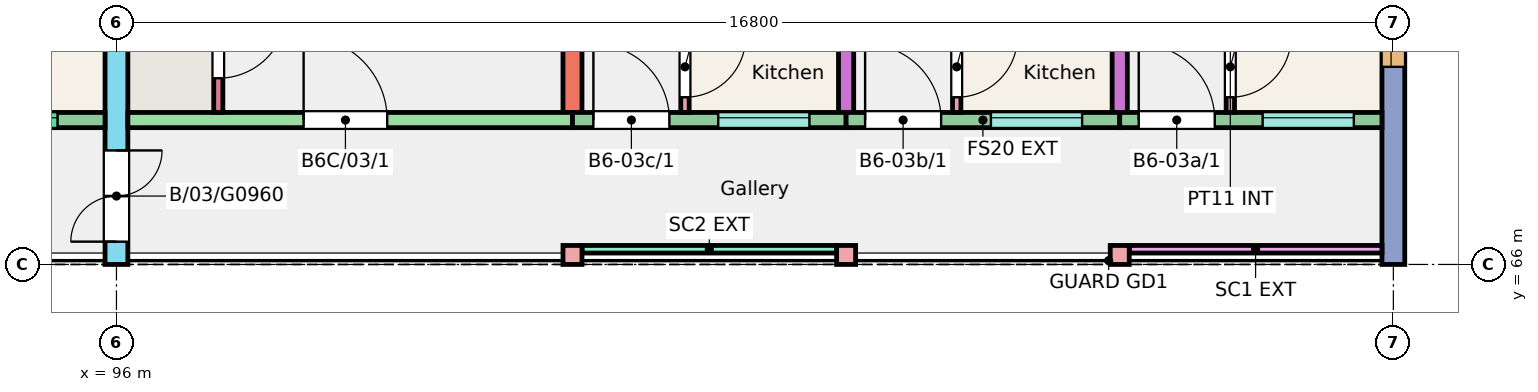
"""IFC4 building model, lengths in metres.
Left out: names, types, materials, properties, quantities, classifications, styles, units other than length and angle.
Written with IfcOpenShell. Run it as: python <this file> out.ifc"""

import sys

from ifc_helpers import new_model, si_unit, direction, frame, frame_2d, origin, origin_2d, place, context, subcontext, project, spatial, rectangle, extrude, element, fill, save


model = new_model("IFC4")
c1 = context("Model", 3, precision=1e-05, world=origin(), true_north=direction((0.0, 1.0)))
c2 = subcontext(c1, "Body", "Model", "MODEL_VIEW")
j1 = project(units=[si_unit("LENGTHUNIT", "METRE"), si_unit("PLANEANGLEUNIT", "RADIAN")], contexts=[c1])
p1 = place(None, origin())
s1 = spatial("IfcSite", under=j1, at=p1, CompositionType="ELEMENT")
p2 = place(p1, origin())
s2 = spatial("IfcBuilding", under=s1, at=p2, CompositionType="ELEMENT")
p3 = place(p2, frame((0.0, 0.0, 9.0)))
s3 = spatial("IfcBuildingStorey", under=s2, at=p3, CompositionType="ELEMENT", Elevation=9.0)
p4 = place(p3, frame((96.0, 66.0, 0.0), z_axis=(0.0, 0.0, 1.0), x_axis=(0.0, 1.0, 0.0)))
e1 = element("IfcWall", 1, at=p4, inside=s3, PredefinedType="SHEAR", context=c2, shape_type="SweptSolid", body=[
    extrude(rectangle(XDim=11.0, YDim=0.3, at=frame_2d((5.5, 0.0))), origin(), (0.0, 0.0, 1.0), 3.0),
])
p5 = place(p4, frame((0.3, 0.0, 0.0)))
e2 = element("IfcOpeningElement", 2, at=p5, cuts=e1, PredefinedType="OPENING", context=c2, shape_type="SweptSolid", body=[
    extrude(rectangle(XDim=1.2, YDim=2.1, at=frame_2d((0.6, 1.05))), frame((0.0, 0.16, 0.0), z_axis=(0.0, -1.0, 0.0), x_axis=(1.0, 0.0, 0.0)), (0.0, 0.0, 1.0), 0.32),
])
p6 = place(p3, frame((102.0, 68.0, 0.0), z_axis=(0.0, 0.0, 1.0), x_axis=(0.0, 1.0, 0.0)))
e3 = element("IfcWall", 3, at=p6, inside=s3, PredefinedType="SHEAR", context=c2, shape_type="SweptSolid", body=[
    extrude(rectangle(XDim=9.0, YDim=0.25, at=frame_2d((4.5, 0.0))), origin(), (0.0, 0.0, 1.0), 3.0),
])
for number, where, z_axis, x_axis in (
    (4, (105.6, 68.0, 0.0), (0.0, 0.0, 1.0), (0.0, 1.0, 0.0)),
    (5, (109.2, 68.0, 0.0), (0.0, 0.0, 1.0), (0.0, 1.0, 0.0)),
):
    element("IfcWall", number, at=place(p3, frame(where, z_axis=z_axis, x_axis=x_axis)), inside=s3, PredefinedType="SHEAR", context=c2, shape_type="SweptSolid", body=[
        extrude(rectangle(XDim=9.0, YDim=0.2, at=frame_2d((4.5, 0.0))), origin(), (0.0, 0.0, 1.0), 3.0),
    ])
p7 = place(p3, frame((112.8, 66.0, 0.0), z_axis=(0.0, 0.0, 1.0), x_axis=(0.0, 1.0, 0.0)))
e6 = element("IfcWall", 6, at=p7, inside=s3, PredefinedType="SHEAR", context=c2, shape_type="SweptSolid", body=[
    extrude(rectangle(XDim=11.0, YDim=0.3, at=frame_2d((5.5, 0.0))), origin(), (0.0, 0.0, 1.0), 3.0),
])
p8 = place(p7, frame((2.6, 0.0, 0.9)))
e7 = element("IfcOpeningElement", 7, at=p8, cuts=e6, PredefinedType="OPENING", context=c2, shape_type="SweptSolid", body=[
    extrude(rectangle(XDim=1.2, YDim=1.5, at=frame_2d((0.6, 0.75))), frame((0.0, 0.16, 0.0), z_axis=(0.0, -1.0, 0.0), x_axis=(1.0, 0.0, 0.0)), (0.0, 0.0, 1.0), 0.32),
])
p9 = place(p7, frame((7.905, 0.0, 0.9)))
e8 = element("IfcOpeningElement", 8, at=p9, cuts=e6, PredefinedType="OPENING", context=c2, shape_type="SweptSolid", body=[
    extrude(rectangle(XDim=1.8, YDim=1.5, at=frame_2d((0.9, 0.75))), frame((0.0, 0.16, 0.0), z_axis=(0.0, -1.0, 0.0), x_axis=(1.0, 0.0, 0.0)), (0.0, 0.0, 1.0), 0.32),
])
p10 = place(p3, frame((92.4, 67.9, 0.0), z_axis=(0.0, 0.0, 1.0), x_axis=(1.0, 0.0, 0.0)))
e9 = element("IfcWall", 9, at=p10, inside=s3, PredefinedType="SOLIDWALL", context=c2, shape_type="SweptSolid", body=[
    extrude(rectangle(XDim=3.45, YDim=0.2, at=frame_2d((1.725, 0.0))), origin(), (0.0, 0.0, 1.0), 3.0),
])
p11 = place(p10, frame((0.725, 0.0, 1.2)))
e10 = element("IfcOpeningElement", 10, at=p11, cuts=e9, PredefinedType="OPENING", context=c2, shape_type="SweptSolid", body=[
    extrude(rectangle(XDim=2.1, YDim=1.2, at=frame_2d((1.05, 0.6))), frame((0.0, 0.11, 0.0), z_axis=(0.0, -1.0, 0.0), x_axis=(1.0, 0.0, 0.0)), (0.0, 0.0, 1.0), 0.22),
])
p12 = place(p3, frame((96.15, 67.9, 0.0), z_axis=(0.0, 0.0, 1.0), x_axis=(1.0, 0.0, 0.0)))
e11 = element("IfcWall", 11, at=p12, inside=s3, PredefinedType="SHEAR", context=c2, shape_type="SweptSolid", body=[
    extrude(rectangle(XDim=5.85, YDim=0.2, at=frame_2d((2.925, 0.0))), origin(), (0.0, 0.0, 1.0), 3.0),
])
p13 = place(p12, frame((2.312, 0.0, 0.0)))
e12 = element("IfcOpeningElement", 12, at=p13, cuts=e11, PredefinedType="OPENING", context=c2, shape_type="SweptSolid", body=[
    extrude(rectangle(XDim=1.1, YDim=2.1, at=frame_2d((0.55, 1.05))), frame((0.0, 0.11, 0.0), z_axis=(0.0, -1.0, 0.0), x_axis=(1.0, 0.0, 0.0)), (0.0, 0.0, 1.0), 0.22),
])
p14 = place(p3, frame((97.34, 68.0, 0.0), z_axis=(0.0, 0.0, 1.0), x_axis=(0.0, 1.0, 0.0)))
e13 = element("IfcWall", 13, at=p14, inside=s3, PredefinedType="SHEAR", context=c2, shape_type="SweptSolid", body=[
    extrude(rectangle(XDim=1.72, YDim=0.12, at=frame_2d((0.86, 0.0))), origin(), (0.0, 0.0, 1.0), 3.0),
])
p15 = place(p14, frame((0.45, 0.0, 0.0)))
e14 = element("IfcOpeningElement", 14, at=p15, cuts=e13, PredefinedType="OPENING", context=c2, shape_type="SweptSolid", body=[
    extrude(rectangle(XDim=0.9, YDim=2.1, at=frame_2d((0.45, 1.05))), frame((0.0, 0.07, 0.0), z_axis=(0.0, -1.0, 0.0), x_axis=(1.0, 0.0, 0.0)), (0.0, 0.0, 1.0), 0.14),
])
p16 = place(p3, frame((102.0, 67.9, 0.0), z_axis=(0.0, 0.0, 1.0), x_axis=(1.0, 0.0, 0.0)))
e15 = element("IfcWall", 15, at=p16, inside=s3, PredefinedType="SOLIDWALL", context=c2, shape_type="SweptSolid", body=[
    extrude(rectangle(XDim=3.6, YDim=0.2, at=frame_2d((1.8, 0.0))), origin(), (0.0, 0.0, 1.0), 3.0),
])
p17 = place(p16, frame((1.917, 0.0, 1.1)))
e16 = element("IfcOpeningElement", 16, at=p17, cuts=e15, PredefinedType="OPENING", context=c2, shape_type="SweptSolid", body=[
    extrude(rectangle(XDim=1.2, YDim=1.3, at=frame_2d((0.6, 0.65))), frame((0.0, 0.11, 0.0), z_axis=(0.0, -1.0, 0.0), x_axis=(1.0, 0.0, 0.0)), (0.0, 0.0, 1.0), 0.22),
])
p18 = place(p16, frame((0.275, 0.0, 0.0)))
e17 = element("IfcOpeningElement", 17, at=p18, cuts=e15, PredefinedType="OPENING", context=c2, shape_type="SweptSolid", body=[
    extrude(rectangle(XDim=1.0, YDim=2.1, at=frame_2d((0.5, 1.05))), frame((0.0, 0.11, 0.0), z_axis=(0.0, -1.0, 0.0), x_axis=(1.0, 0.0, 0.0)), (0.0, 0.0, 1.0), 0.22),
])
p19 = place(p3, frame((105.6, 67.9, 0.0), z_axis=(0.0, 0.0, 1.0), x_axis=(1.0, 0.0, 0.0)))
e18 = element("IfcWall", 18, at=p19, inside=s3, PredefinedType="SOLIDWALL", context=c2, shape_type="SweptSolid", body=[
    extrude(rectangle(XDim=3.6, YDim=0.2, at=frame_2d((1.8, 0.0))), origin(), (0.0, 0.0, 1.0), 3.0),
])
p20 = place(p19, frame((1.905, 0.0, 1.1)))
e19 = element("IfcOpeningElement", 19, at=p20, cuts=e18, PredefinedType="OPENING", context=c2, shape_type="SweptSolid", body=[
    extrude(rectangle(XDim=1.2, YDim=1.3, at=frame_2d((0.6, 0.65))), frame((0.0, 0.11, 0.0), z_axis=(0.0, -1.0, 0.0), x_axis=(1.0, 0.0, 0.0)), (0.0, 0.0, 1.0), 0.22),
])
p21 = place(p19, frame((0.25, 0.0, 0.0)))
e20 = element("IfcOpeningElement", 20, at=p21, cuts=e18, PredefinedType="OPENING", context=c2, shape_type="SweptSolid", body=[
    extrude(rectangle(XDim=1.0, YDim=2.1, at=frame_2d((0.5, 1.05))), frame((0.0, 0.11, 0.0), z_axis=(0.0, -1.0, 0.0), x_axis=(1.0, 0.0, 0.0)), (0.0, 0.0, 1.0), 0.22),
])
p22 = place(p3, frame((109.2, 67.9, 0.0), z_axis=(0.0, 0.0, 1.0), x_axis=(1.0, 0.0, 0.0)))
e21 = element("IfcWall", 21, at=p22, inside=s3, PredefinedType="SOLIDWALL", context=c2, shape_type="SweptSolid", body=[
    extrude(rectangle(XDim=3.45, YDim=0.2, at=frame_2d((1.725, 0.0))), origin(), (0.0, 0.0, 1.0), 3.0),
])
p23 = place(p22, frame((1.88, 0.0, 1.1)))
e22 = element("IfcOpeningElement", 22, at=p23, cuts=e21, PredefinedType="OPENING", context=c2, shape_type="SweptSolid", body=[
    extrude(rectangle(XDim=1.2, YDim=1.3, at=frame_2d((0.6, 0.65))), frame((0.0, 0.11, 0.0), z_axis=(0.0, -1.0, 0.0), x_axis=(1.0, 0.0, 0.0)), (0.0, 0.0, 1.0), 0.22),
])
p24 = place(p22, frame((0.25, 0.0, 0.0)))
e23 = element("IfcOpeningElement", 23, at=p24, cuts=e21, PredefinedType="OPENING", context=c2, shape_type="SweptSolid", body=[
    extrude(rectangle(XDim=1.0, YDim=2.1, at=frame_2d((0.5, 1.05))), frame((0.0, 0.11, 0.0), z_axis=(0.0, -1.0, 0.0), x_axis=(1.0, 0.0, 0.0)), (0.0, 0.0, 1.0), 0.22),
])
for number, where, z_axis, x_axis in (
    (24, (102.0, 66.125, 0.0), (0.0, 0.0, 1.0), (1.0, 0.0, 0.0)),
    (25, (105.6, 66.125, 0.0), (0.0, 0.0, 1.0), (1.0, 0.0, 0.0)),
    (26, (109.2, 66.125, 0.0), (0.0, 0.0, 1.0), (1.0, 0.0, 0.0)),
):
    element("IfcColumn", number, at=place(p3, frame(where, z_axis=z_axis, x_axis=x_axis)), inside=s3, PredefinedType="COLUMN", context=c2, shape_type="SweptSolid", body=[
        extrude(rectangle(XDim=0.25, YDim=0.25, at=origin_2d()), origin(), (0.0, 0.0, 1.0), 3.0),
    ])
p25 = place(p3, frame((102.125, 66.2, 0.0), z_axis=(0.0, 0.0, 1.0), x_axis=(1.0, 0.0, 0.0)))
e27 = element("IfcWall", 27, at=p25, inside=s3, PredefinedType="SOLIDWALL", context=c2, shape_type="SweptSolid", body=[
    extrude(rectangle(XDim=3.35, YDim=0.1, at=frame_2d((1.675, 0.0))), origin(), (0.0, 0.0, 1.0), 2.45),
])
p26 = place(p3, frame((109.325, 66.2, 0.0), z_axis=(0.0, 0.0, 1.0), x_axis=(1.0, 0.0, 0.0)))
e28 = element("IfcWall", 28, at=p26, inside=s3, PredefinedType="SOLIDWALL", context=c2, shape_type="SweptSolid", body=[
    extrude(rectangle(XDim=3.325, YDim=0.1, at=frame_2d((1.663, 0.0))), origin(), (0.0, 0.0, 1.0), 2.45),
])
p27 = place(p3, frame((110.655, 68.0, 0.0), z_axis=(0.0, 0.0, 1.0), x_axis=(0.0, 1.0, 0.0)))
e29 = element("IfcWall", 29, at=p27, inside=s3, PredefinedType="PARTITIONING", context=c2, shape_type="SweptSolid", body=[
    extrude(rectangle(XDim=4.5, YDim=0.11, at=frame_2d((2.25, 0.0))), origin(), (0.0, 0.0, 1.0), 2.8),
])
p28 = place(p27, frame((0.2, 0.0, 0.0)))
e30 = element("IfcOpeningElement", 30, at=p28, cuts=e29, PredefinedType="OPENING", context=c2, shape_type="SweptSolid", body=[
    extrude(rectangle(XDim=0.8, YDim=2.1, at=frame_2d((0.4, 1.05))), frame((0.0, 0.065, 0.0), z_axis=(0.0, -1.0, 0.0), x_axis=(1.0, 0.0, 0.0)), (0.0, 0.0, 1.0), 0.13),
])
p29 = place(p27, frame((3.55, 0.0, 0.0)))
e31 = element("IfcOpeningElement", 31, at=p29, cuts=e29, PredefinedType="OPENING", context=c2, shape_type="SweptSolid", body=[
    extrude(rectangle(XDim=0.8, YDim=2.1, at=frame_2d((0.4, 1.05))), frame((0.0, 0.065, 0.0), z_axis=(0.0, -1.0, 0.0), x_axis=(1.0, 0.0, 0.0)), (0.0, 0.0, 1.0), 0.13),
])
p30 = place(p3, frame((107.055, 68.0, 0.0), z_axis=(0.0, 0.0, 1.0), x_axis=(0.0, 1.0, 0.0)))
e32 = element("IfcWall", 32, at=p30, inside=s3, PredefinedType="PARTITIONING", context=c2, shape_type="SweptSolid", body=[
    extrude(rectangle(XDim=4.3, YDim=0.11, at=frame_2d((2.15, 0.0))), origin(), (0.0, 0.0, 1.0), 2.8),
])
p31 = place(p30, frame((0.2, 0.0, 0.0)))
e33 = element("IfcOpeningElement", 33, at=p31, cuts=e32, PredefinedType="OPENING", context=c2, shape_type="SweptSolid", body=[
    extrude(rectangle(XDim=0.8, YDim=2.1, at=frame_2d((0.4, 1.05))), frame((0.0, 0.065, 0.0), z_axis=(0.0, -1.0, 0.0), x_axis=(1.0, 0.0, 0.0)), (0.0, 0.0, 1.0), 0.13),
])
p32 = place(p30, frame((3.35, 0.0, 0.0)))
e34 = element("IfcOpeningElement", 34, at=p32, cuts=e32, PredefinedType="OPENING", context=c2, shape_type="SweptSolid", body=[
    extrude(rectangle(XDim=0.8, YDim=2.1, at=frame_2d((0.4, 1.05))), frame((0.0, 0.065, 0.0), z_axis=(0.0, -1.0, 0.0), x_axis=(1.0, 0.0, 0.0)), (0.0, 0.0, 1.0), 0.13),
])
p33 = place(p3, frame((103.48, 68.0, 0.0), z_axis=(0.0, 0.0, 1.0), x_axis=(0.0, 1.0, 0.0)))
e35 = element("IfcWall", 35, at=p33, inside=s3, PredefinedType="PARTITIONING", context=c2, shape_type="SweptSolid", body=[
    extrude(rectangle(XDim=4.3, YDim=0.11, at=frame_2d((2.15, 0.0))), origin(), (0.0, 0.0, 1.0), 2.8),
])
p34 = place(p33, frame((0.2, 0.0, 0.0)))
e36 = element("IfcOpeningElement", 36, at=p34, cuts=e35, PredefinedType="OPENING", context=c2, shape_type="SweptSolid", body=[
    extrude(rectangle(XDim=0.8, YDim=2.1, at=frame_2d((0.4, 1.05))), frame((0.0, 0.065, 0.0), z_axis=(0.0, -1.0, 0.0), x_axis=(1.0, 0.0, 0.0)), (0.0, 0.0, 1.0), 0.13),
])
p35 = place(p33, frame((3.35, 0.0, 0.0)))
e37 = element("IfcOpeningElement", 37, at=p35, cuts=e35, PredefinedType="OPENING", context=c2, shape_type="SweptSolid", body=[
    extrude(rectangle(XDim=0.8, YDim=2.1, at=frame_2d((0.4, 1.05))), frame((0.0, 0.065, 0.0), z_axis=(0.0, -1.0, 0.0), x_axis=(1.0, 0.0, 0.0)), (0.0, 0.0, 1.0), 0.13),
])
p36 = place(p11, origin())
e38 = element("IfcWindow", 38, at=p36, inside=s3, PartitioningType="SINGLE_PANEL", PredefinedType="WINDOW", context=c2, shape_type="SweptSolid", body=[
    extrude(rectangle(XDim=2.1, YDim=1.2, at=frame_2d((1.05, 0.6))), frame((0.0, 0.06, 0.0), z_axis=(0.0, -1.0, 0.0), x_axis=(1.0, 0.0, 0.0)), (0.0, 0.0, 1.0), 0.06),
])
fill(e10, e38)
p37 = place(p23, origin())
e39 = element("IfcWindow", 39, at=p37, inside=s3, PartitioningType="SINGLE_PANEL", PredefinedType="WINDOW", context=c2, shape_type="SweptSolid", body=[
    extrude(rectangle(XDim=1.2, YDim=1.3, at=frame_2d((0.6, 0.65))), frame((0.0, 0.06, 0.0), z_axis=(0.0, -1.0, 0.0), x_axis=(1.0, 0.0, 0.0)), (0.0, 0.0, 1.0), 0.06),
])
fill(e22, e39)
p38 = place(p8, origin())
e40 = element("IfcWindow", 40, at=p38, inside=s3, PartitioningType="SINGLE_PANEL", PredefinedType="WINDOW", context=c2, shape_type="SweptSolid", body=[
    extrude(rectangle(XDim=1.2, YDim=1.5, at=frame_2d((0.6, 0.75))), frame((0.0, 0.06, 0.0), z_axis=(0.0, -1.0, 0.0), x_axis=(1.0, 0.0, 0.0)), (0.0, 0.0, 1.0), 0.06),
])
fill(e7, e40)
p39 = place(p20, origin())
e41 = element("IfcWindow", 41, at=p39, inside=s3, PartitioningType="SINGLE_PANEL", PredefinedType="WINDOW", context=c2, shape_type="SweptSolid", body=[
    extrude(rectangle(XDim=1.2, YDim=1.3, at=frame_2d((0.6, 0.65))), frame((0.0, 0.06, 0.0), z_axis=(0.0, -1.0, 0.0), x_axis=(1.0, 0.0, 0.0)), (0.0, 0.0, 1.0), 0.06),
])
fill(e19, e41)
p40 = place(p17, origin())
e42 = element("IfcWindow", 42, at=p40, inside=s3, PartitioningType="SINGLE_PANEL", PredefinedType="WINDOW", context=c2, shape_type="SweptSolid", body=[
    extrude(rectangle(XDim=1.2, YDim=1.3, at=frame_2d((0.6, 0.65))), frame((0.0, 0.06, 0.0), z_axis=(0.0, -1.0, 0.0), x_axis=(1.0, 0.0, 0.0)), (0.0, 0.0, 1.0), 0.06),
])
fill(e16, e42)
p41 = place(p24, origin())
e43 = element("IfcDoor", 43, at=p41, inside=s3, OperationType="SINGLE_SWING_LEFT", PredefinedType="DOOR", context=c2, shape_type="SweptSolid", body=[
    extrude(rectangle(XDim=1.0, YDim=2.1, at=frame_2d((0.5, 1.05))), frame((0.0, 0.025, 0.0), z_axis=(0.0, -1.0, 0.0), x_axis=(1.0, 0.0, 0.0)), (0.0, 0.0, 1.0), 0.05),
])
fill(e23, e43)
p42 = place(p28, origin())
e44 = element("IfcDoor", 44, at=p42, inside=s3, OperationType="SINGLE_SWING_RIGHT", PredefinedType="DOOR", context=c2, shape_type="SweptSolid", body=[
    extrude(rectangle(XDim=0.8, YDim=2.1, at=frame_2d((0.4, 1.05))), frame((0.0, 0.025, 0.0), z_axis=(0.0, -1.0, 0.0), x_axis=(1.0, 0.0, 0.0)), (0.0, 0.0, 1.0), 0.05),
])
fill(e30, e44)
p43 = place(p21, origin())
e45 = element("IfcDoor", 45, at=p43, inside=s3, OperationType="SINGLE_SWING_LEFT", PredefinedType="DOOR", context=c2, shape_type="SweptSolid", body=[
    extrude(rectangle(XDim=1.0, YDim=2.1, at=frame_2d((0.5, 1.05))), frame((0.0, 0.025, 0.0), z_axis=(0.0, -1.0, 0.0), x_axis=(1.0, 0.0, 0.0)), (0.0, 0.0, 1.0), 0.05),
])
fill(e20, e45)
p44 = place(p31, origin())
e46 = element("IfcDoor", 46, at=p44, inside=s3, OperationType="SINGLE_SWING_RIGHT", PredefinedType="DOOR", context=c2, shape_type="SweptSolid", body=[
    extrude(rectangle(XDim=0.8, YDim=2.1, at=frame_2d((0.4, 1.05))), frame((0.0, 0.025, 0.0), z_axis=(0.0, -1.0, 0.0), x_axis=(1.0, 0.0, 0.0)), (0.0, 0.0, 1.0), 0.05),
])
fill(e33, e46)
p45 = place(p18, origin())
e47 = element("IfcDoor", 47, at=p45, inside=s3, OperationType="SINGLE_SWING_LEFT", PredefinedType="DOOR", context=c2, shape_type="SweptSolid", body=[
    extrude(rectangle(XDim=1.0, YDim=2.1, at=frame_2d((0.5, 1.05))), frame((0.0, 0.025, 0.0), z_axis=(0.0, -1.0, 0.0), x_axis=(1.0, 0.0, 0.0)), (0.0, 0.0, 1.0), 0.05),
])
fill(e17, e47)
p46 = place(p34, origin())
e48 = element("IfcDoor", 48, at=p46, inside=s3, OperationType="SINGLE_SWING_RIGHT", PredefinedType="DOOR", context=c2, shape_type="SweptSolid", body=[
    extrude(rectangle(XDim=0.8, YDim=2.1, at=frame_2d((0.4, 1.05))), frame((0.0, 0.025, 0.0), z_axis=(0.0, -1.0, 0.0), x_axis=(1.0, 0.0, 0.0)), (0.0, 0.0, 1.0), 0.05),
])
fill(e36, e48)
p47 = place(p13, origin())
e49 = element("IfcDoor", 49, at=p47, inside=s3, OperationType="SINGLE_SWING_LEFT", PredefinedType="DOOR", context=c2, shape_type="SweptSolid", body=[
    extrude(rectangle(XDim=1.1, YDim=2.1, at=frame_2d((0.55, 1.05))), frame((0.0, 0.025, 0.0), z_axis=(0.0, -1.0, 0.0), x_axis=(1.0, 0.0, 0.0)), (0.0, 0.0, 1.0), 0.05),
])
fill(e12, e49)
p48 = place(p15, origin())
e50 = element("IfcDoor", 50, at=p48, inside=s3, OperationType="SINGLE_SWING_RIGHT", PredefinedType="DOOR", context=c2, shape_type="SweptSolid", body=[
    extrude(rectangle(XDim=0.9, YDim=2.1, at=frame_2d((0.45, 1.05))), frame((0.0, 0.025, 0.0), z_axis=(0.0, -1.0, 0.0), x_axis=(1.0, 0.0, 0.0)), (0.0, 0.0, 1.0), 0.05),
])
fill(e14, e50)
p49 = place(p5, origin())
e51 = element("IfcDoor", 51, at=p49, inside=s3, OperationType="DOUBLE_DOOR_SINGLE_SWING", PredefinedType="DOOR", context=c2, shape_type="SweptSolid", body=[
    extrude(rectangle(XDim=1.2, YDim=2.1, at=frame_2d((0.6, 1.05))), frame((0.0, 0.025, 0.0), z_axis=(0.0, -1.0, 0.0), x_axis=(1.0, 0.0, 0.0)), (0.0, 0.0, 1.0), 0.05),
])
fill(e2, e51)
save(model, sys.argv[1])
